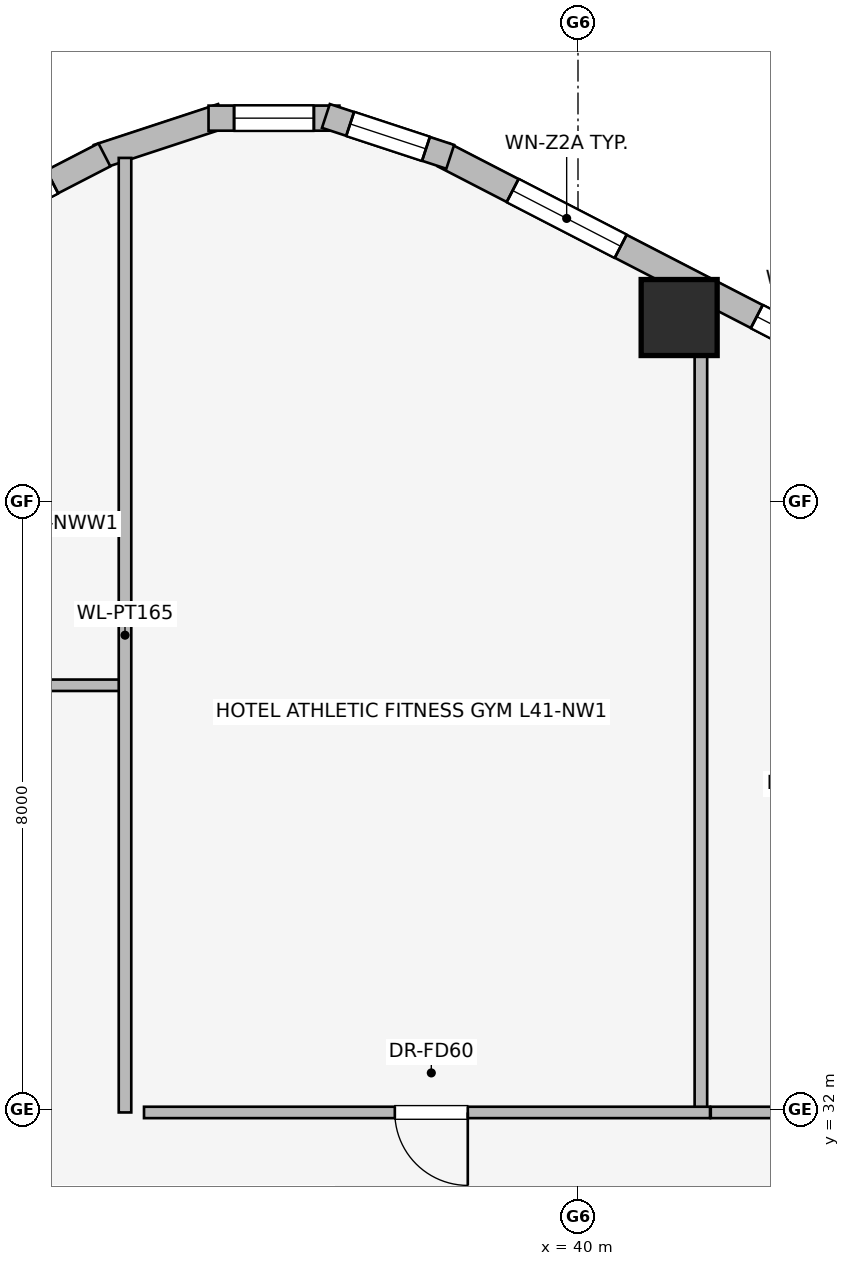
"""IFC4 building model, lengths in metres.
Left out: names, types, materials, properties, quantities, classifications, styles, units other than length and angle.
Written with IfcOpenShell. Run it as: python <this file> out.ifc"""

import sys

from ifc_helpers import new_model, si_unit, direction, frame, frame_2d, origin, origin_2d, place, context, subcontext, project, spatial, rectangle, extrude, element, fill, save


model = new_model("IFC4")
c1 = context("Model", 3, precision=1e-05, world=origin(), true_north=direction((0.0, 1.0)))
c2 = subcontext(c1, "Body", "Model", "MODEL_VIEW")
j1 = project(units=[si_unit("LENGTHUNIT", "METRE"), si_unit("PLANEANGLEUNIT", "RADIAN")], contexts=[c1])
p1 = place(None, origin())
s1 = spatial("IfcSite", under=j1, at=p1, CompositionType="ELEMENT")
p2 = place(p1, origin())
s2 = spatial("IfcBuilding", under=s1, at=p2, CompositionType="ELEMENT")
p3 = place(p2, frame((0.0, 0.0, 153.3)))
s3 = spatial("IfcBuildingStorey", under=s2, at=p3, CompositionType="ELEMENT", Elevation=153.3)
p4 = place(p3, frame((41.331, 42.418, 0.0), z_axis=(0.0, 0.0, 1.0), x_axis=(1.0, 0.0, 0.0)))
e1 = element("IfcColumn", 1, at=p4, inside=s3, PredefinedType="COLUMN", context=c2, shape_type="SweptSolid", body=[
    extrude(rectangle(XDim=1.0, YDim=1.0, at=origin_2d()), origin(), (0.0, 0.0, 1.0), 3.45),
])
p5 = place(p3, frame((38.231, 44.558, 0.0), z_axis=(0.0, 0.0, 1.0), x_axis=(0.888613612362, -0.458656568606, 0.0)))
e2 = element("IfcWall", 2, at=p5, inside=s3, PredefinedType="STANDARD", context=c2, shape_type="SweptSolid", body=[
    extrude(rectangle(XDim=18.681, YDim=0.34, at=frame_2d((9.34, 0.0))), origin(), (0.0, 0.0, 1.0), 3.19),
])
p6 = place(p5, frame((1.023, 0.0, 0.75)))
e3 = element("IfcOpeningElement", 3, at=p6, cuts=e2, PredefinedType="OPENING", context=c2, shape_type="SweptSolid", body=[
    extrude(rectangle(XDim=1.6, YDim=1.55, at=frame_2d((0.8, 0.775))), frame((0.0, 0.18, 0.0), z_axis=(0.0, -1.0, 0.0), x_axis=(1.0, 0.0, 0.0)), (0.0, 0.0, 1.0), 0.36),
])
p7 = place(p5, frame((4.638, 0.0, 0.75)))
e4 = element("IfcOpeningElement", 4, at=p7, cuts=e2, PredefinedType="OPENING", context=c2, shape_type="SweptSolid", body=[
    extrude(rectangle(XDim=2.1, YDim=1.5, at=frame_2d((1.05, 0.75))), frame((0.0, 0.18, 0.0), z_axis=(0.0, -1.0, 0.0), x_axis=(1.0, 0.0, 0.0)), (0.0, 0.0, 1.0), 0.36),
])
p8 = place(p5, frame((7.262, 0.0, 0.75)))
e5 = element("IfcOpeningElement", 5, at=p8, cuts=e2, PredefinedType="OPENING", context=c2, shape_type="SweptSolid", body=[
    extrude(rectangle(XDim=2.1, YDim=1.5, at=frame_2d((1.05, 0.75))), frame((0.0, 0.18, 0.0), z_axis=(0.0, -1.0, 0.0), x_axis=(1.0, 0.0, 0.0)), (0.0, 0.0, 1.0), 0.36),
])
p9 = place(p5, frame((9.885, 0.0, 0.75)))
e6 = element("IfcOpeningElement", 6, at=p9, cuts=e2, PredefinedType="OPENING", context=c2, shape_type="SweptSolid", body=[
    extrude(rectangle(XDim=2.1, YDim=1.5, at=frame_2d((1.05, 0.75))), frame((0.0, 0.18, 0.0), z_axis=(0.0, -1.0, 0.0), x_axis=(1.0, 0.0, 0.0)), (0.0, 0.0, 1.0), 0.36),
])
p10 = place(p5, frame((13.113, 0.0, 0.75)))
e7 = element("IfcOpeningElement", 7, at=p10, cuts=e2, PredefinedType="OPENING", context=c2, shape_type="SweptSolid", body=[
    extrude(rectangle(XDim=1.05, YDim=1.4, at=frame_2d((0.525, 0.7))), frame((0.0, 0.18, 0.0), z_axis=(0.0, -1.0, 0.0), x_axis=(1.0, 0.0, 0.0)), (0.0, 0.0, 1.0), 0.36),
])
p11 = place(p5, frame((15.808, 0.0, 0.75)))
e8 = element("IfcOpeningElement", 8, at=p11, cuts=e2, PredefinedType="OPENING", context=c2, shape_type="SweptSolid", body=[
    extrude(rectangle(XDim=2.1, YDim=1.5, at=frame_2d((1.05, 0.75))), frame((0.0, 0.18, 0.0), z_axis=(0.0, -1.0, 0.0), x_axis=(1.0, 0.0, 0.0)), (0.0, 0.0, 1.0), 0.36),
])
p12 = place(p3, frame((33.681, 44.532, 0.0), z_axis=(0.0, 0.0, 1.0), x_axis=(0.949937416267, 0.312440242569, 0.0)))
e9 = element("IfcWall", 9, at=p12, inside=s3, PredefinedType="STANDARD", context=c2, shape_type="SweptSolid", body=[
    extrude(rectangle(XDim=1.722, YDim=0.33, at=frame_2d((0.861, 0.0))), origin(), (0.0, 0.0, 1.0), 3.19),
])
p13 = place(p3, frame((35.139, 45.041, 0.0), z_axis=(0.0, 0.0, 1.0), x_axis=(1.0, 0.0, 0.0)))
e10 = element("IfcWall", 10, at=p13, inside=s3, PredefinedType="STANDARD", context=c2, shape_type="SweptSolid", body=[
    extrude(rectangle(XDim=1.722, YDim=0.33, at=frame_2d((0.861, 0.0))), origin(), (0.0, 0.0, 1.0), 3.19),
])
p14 = place(p13, frame((0.336, 0.0, 0.75)))
e11 = element("IfcOpeningElement", 11, at=p14, cuts=e10, PredefinedType="OPENING", context=c2, shape_type="SweptSolid", body=[
    extrude(rectangle(XDim=1.05, YDim=1.4, at=frame_2d((0.525, 0.7))), frame((0.0, 0.175, 0.0), z_axis=(0.0, -1.0, 0.0), x_axis=(1.0, 0.0, 0.0)), (0.0, 0.0, 1.0), 0.35),
])
p15 = place(p3, frame((36.683, 45.07, 0.0), z_axis=(0.0, 0.0, 1.0), x_axis=(0.949937416267, -0.312440242569, 0.0)))
e12 = element("IfcWall", 12, at=p15, inside=s3, PredefinedType="STANDARD", context=c2, shape_type="SweptSolid", body=[
    extrude(rectangle(XDim=1.722, YDim=0.33, at=frame_2d((0.861, 0.0))), origin(), (0.0, 0.0, 1.0), 3.19),
])
p16 = place(p15, frame((0.336, 0.0, 0.75)))
e13 = element("IfcOpeningElement", 13, at=p16, cuts=e12, PredefinedType="OPENING", context=c2, shape_type="SweptSolid", body=[
    extrude(rectangle(XDim=1.05, YDim=1.4, at=frame_2d((0.525, 0.7))), frame((0.0, 0.175, 0.0), z_axis=(0.0, -1.0, 0.0), x_axis=(1.0, 0.0, 0.0)), (0.0, 0.0, 1.0), 0.35),
])
p17 = place(p3, frame((17.169, 35.99, 0.0), z_axis=(0.0, 0.0, 1.0), x_axis=(0.888613612362, 0.458656568606, 0.0)))
e14 = element("IfcWall", 14, at=p17, inside=s3, PredefinedType="STANDARD", context=c2, shape_type="SweptSolid", body=[
    extrude(rectangle(XDim=18.681, YDim=0.34, at=frame_2d((9.34, 0.0))), origin(), (0.0, 0.0, 1.0), 3.19),
])
p18 = place(p17, frame((8.79, 0.0, 0.0)))
e15 = element("IfcOpeningElement", 15, at=p18, cuts=e14, PredefinedType="OPENING", context=c2, shape_type="SweptSolid", body=[
    extrude(rectangle(XDim=1.1, YDim=2.04, at=frame_2d((0.55, 1.02))), frame((0.0, 0.18, 0.0), z_axis=(0.0, -1.0, 0.0), x_axis=(1.0, 0.0, 0.0)), (0.0, 0.0, 1.0), 0.36),
])
p19 = place(p17, frame((1.023, 0.0, 0.75)))
e16 = element("IfcOpeningElement", 16, at=p19, cuts=e14, PredefinedType="OPENING", context=c2, shape_type="SweptSolid", body=[
    extrude(rectangle(XDim=1.6, YDim=1.55, at=frame_2d((0.8, 0.775))), frame((0.0, 0.18, 0.0), z_axis=(0.0, -1.0, 0.0), x_axis=(1.0, 0.0, 0.0)), (0.0, 0.0, 1.0), 0.36),
])
p20 = place(p17, frame((5.373, 0.0, 0.75)))
e17 = element("IfcOpeningElement", 17, at=p20, cuts=e14, PredefinedType="OPENING", context=c2, shape_type="SweptSolid", body=[
    extrude(rectangle(XDim=2.1, YDim=1.5, at=frame_2d((1.05, 0.75))), frame((0.0, 0.18, 0.0), z_axis=(0.0, -1.0, 0.0), x_axis=(1.0, 0.0, 0.0)), (0.0, 0.0, 1.0), 0.36),
])
p21 = place(p17, frame((10.434, 0.0, 0.75)))
e18 = element("IfcOpeningElement", 18, at=p21, cuts=e14, PredefinedType="OPENING", context=c2, shape_type="SweptSolid", body=[
    extrude(rectangle(XDim=1.6, YDim=1.55, at=frame_2d((0.8, 0.775))), frame((0.0, 0.18, 0.0), z_axis=(0.0, -1.0, 0.0), x_axis=(1.0, 0.0, 0.0)), (0.0, 0.0, 1.0), 0.36),
])
p22 = place(p17, frame((12.481, 0.0, 0.75)))
e19 = element("IfcOpeningElement", 19, at=p22, cuts=e14, PredefinedType="OPENING", context=c2, shape_type="SweptSolid", body=[
    extrude(rectangle(XDim=1.6, YDim=1.55, at=frame_2d((0.8, 0.775))), frame((0.0, 0.18, 0.0), z_axis=(0.0, -1.0, 0.0), x_axis=(1.0, 0.0, 0.0)), (0.0, 0.0, 1.0), 0.36),
])
p23 = place(p17, frame((15.808, 0.0, 0.75)))
e20 = element("IfcOpeningElement", 20, at=p23, cuts=e14, PredefinedType="OPENING", context=c2, shape_type="SweptSolid", body=[
    extrude(rectangle(XDim=2.1, YDim=1.5, at=frame_2d((1.05, 0.75))), frame((0.0, 0.18, 0.0), z_axis=(0.0, -1.0, 0.0), x_axis=(1.0, 0.0, 0.0)), (0.0, 0.0, 1.0), 0.36),
])
p24 = place(p3, frame((34.0, 37.58, 0.0), z_axis=(0.0, 0.0, 1.0), x_axis=(-1.0, 0.0, 0.0)))
e21 = element("IfcWall", 21, at=p24, inside=s3, PredefinedType="PARTITIONING", context=c2, shape_type="SweptSolid", body=[
    extrude(rectangle(XDim=13.707, YDim=0.15, at=frame_2d((6.854, 0.0))), origin(), (0.0, 0.0, 1.0), 2.582),
])
p25 = place(p24, frame((5.195, 0.0, 0.0)))
e22 = element("IfcOpeningElement", 22, at=p25, cuts=e21, PredefinedType="OPENING", context=c2, shape_type="SweptSolid", body=[
    extrude(rectangle(XDim=0.96, YDim=2.0, at=frame_2d((0.48, 1.0))), frame((0.0, 0.085, 0.0), z_axis=(0.0, -1.0, 0.0), x_axis=(1.0, 0.0, 0.0)), (0.0, 0.0, 1.0), 0.17),
])
p26 = place(p3, frame((34.04, 31.96, 0.0), z_axis=(0.0, 0.0, 1.0), x_axis=(0.0, 1.0, 0.0)))
e23 = element("IfcWall", 23, at=p26, inside=s3, PredefinedType="PARTITIONING", context=c2, shape_type="SweptSolid", body=[
    extrude(rectangle(XDim=12.558, YDim=0.165, at=frame_2d((6.279, 0.0))), origin(), (0.0, 0.0, 1.0), 3.19),
])
p27 = place(p3, frame((41.617, 31.97, 0.0), z_axis=(0.0, 0.0, 1.0), x_axis=(0.0, 1.0, 0.0)))
e24 = element("IfcWall", 24, at=p27, inside=s3, PredefinedType="PARTITIONING", context=c2, shape_type="SweptSolid", body=[
    extrude(rectangle(XDim=10.705, YDim=0.165, at=frame_2d((5.353, 0.0))), origin(), (0.0, 0.0, 1.0), 2.42),
])
p28 = place(p3, frame((41.737, 31.96, 0.0), z_axis=(0.0, 0.0, 1.0), x_axis=(-1.0, 0.0, 0.0)))
e25 = element("IfcWall", 25, at=p28, inside=s3, PredefinedType="PARTITIONING", context=c2, shape_type="SweptSolid", body=[
    extrude(rectangle(XDim=7.447, YDim=0.15, at=frame_2d((3.724, 0.0))), origin(), (0.0, 0.0, 1.0), 3.19),
])
p29 = place(p28, frame((3.187, 0.0, 0.0)))
e26 = element("IfcOpeningElement", 26, at=p29, cuts=e25, PredefinedType="OPENING", context=c2, shape_type="SweptSolid", body=[
    extrude(rectangle(XDim=0.96, YDim=2.0, at=frame_2d((0.48, 1.0))), frame((0.0, 0.085, 0.0), z_axis=(0.0, -1.0, 0.0), x_axis=(1.0, 0.0, 0.0)), (0.0, 0.0, 1.0), 0.17),
])
p30 = place(p3, frame((49.251, 31.96, 0.0), z_axis=(0.0, 0.0, 1.0), x_axis=(-1.0, 0.0, 0.0)))
e27 = element("IfcWall", 27, at=p30, inside=s3, PredefinedType="PARTITIONING", context=c2, shape_type="SweptSolid", body=[
    extrude(rectangle(XDim=7.504, YDim=0.15, at=frame_2d((3.752, 0.0))), origin(), (0.0, 0.0, 1.0), 3.19),
])
p31 = place(p30, frame((3.272, 0.0, 0.0)))
e28 = element("IfcOpeningElement", 28, at=p31, cuts=e27, PredefinedType="OPENING", context=c2, shape_type="SweptSolid", body=[
    extrude(rectangle(XDim=0.96, YDim=2.0, at=frame_2d((0.48, 1.0))), frame((0.0, 0.085, 0.0), z_axis=(0.0, -1.0, 0.0), x_axis=(1.0, 0.0, 0.0)), (0.0, 0.0, 1.0), 0.17),
])
p32 = place(p6, origin())
e29 = element("IfcWindow", 29, at=p32, inside=s3, PartitioningType="SINGLE_PANEL", PredefinedType="WINDOW", context=c2, shape_type="SweptSolid", body=[
    extrude(rectangle(XDim=1.6, YDim=1.55, at=frame_2d((0.8, 0.775))), frame((0.0, 0.03, 0.0), z_axis=(0.0, -1.0, 0.0), x_axis=(1.0, 0.0, 0.0)), (0.0, 0.0, 1.0), 0.06),
])
fill(e3, e29)
p33 = place(p7, origin())
e30 = element("IfcWindow", 30, at=p33, inside=s3, PartitioningType="SINGLE_PANEL", PredefinedType="WINDOW", context=c2, shape_type="SweptSolid", body=[
    extrude(rectangle(XDim=2.1, YDim=1.5, at=frame_2d((1.05, 0.75))), frame((0.0, 0.03, 0.0), z_axis=(0.0, -1.0, 0.0), x_axis=(1.0, 0.0, 0.0)), (0.0, 0.0, 1.0), 0.06),
])
fill(e4, e30)
p34 = place(p14, origin())
e31 = element("IfcWindow", 31, at=p34, inside=s3, PartitioningType="SINGLE_PANEL", PredefinedType="WINDOW", context=c2, shape_type="SweptSolid", body=[
    extrude(rectangle(XDim=1.05, YDim=1.4, at=frame_2d((0.525, 0.7))), frame((0.0, 0.03, 0.0), z_axis=(0.0, -1.0, 0.0), x_axis=(1.0, 0.0, 0.0)), (0.0, 0.0, 1.0), 0.06),
])
fill(e11, e31)
p35 = place(p16, origin())
e32 = element("IfcWindow", 32, at=p35, inside=s3, PartitioningType="SINGLE_PANEL", PredefinedType="WINDOW", context=c2, shape_type="SweptSolid", body=[
    extrude(rectangle(XDim=1.05, YDim=1.4, at=frame_2d((0.525, 0.7))), frame((0.0, 0.03, 0.0), z_axis=(0.0, -1.0, 0.0), x_axis=(1.0, 0.0, 0.0)), (0.0, 0.0, 1.0), 0.06),
])
fill(e13, e32)
p36 = place(p23, origin())
e33 = element("IfcWindow", 33, at=p36, inside=s3, PartitioningType="SINGLE_PANEL", PredefinedType="WINDOW", context=c2, shape_type="SweptSolid", body=[
    extrude(rectangle(XDim=2.1, YDim=1.5, at=frame_2d((1.05, 0.75))), frame((0.0, 0.03, 0.0), z_axis=(0.0, -1.0, 0.0), x_axis=(1.0, 0.0, 0.0)), (0.0, 0.0, 1.0), 0.06),
])
fill(e20, e33)
p37 = place(p29, origin())
e34 = element("IfcDoor", 34, at=p37, inside=s3, OperationType="SINGLE_SWING_LEFT", PredefinedType="DOOR", context=c2, shape_type="SweptSolid", body=[
    extrude(rectangle(XDim=0.96, YDim=2.0, at=frame_2d((0.48, 1.0))), frame((0.0, 0.025, 0.0), z_axis=(0.0, -1.0, 0.0), x_axis=(1.0, 0.0, 0.0)), (0.0, 0.0, 1.0), 0.05),
])
fill(e26, e34)
save(model, sys.argv[1])
